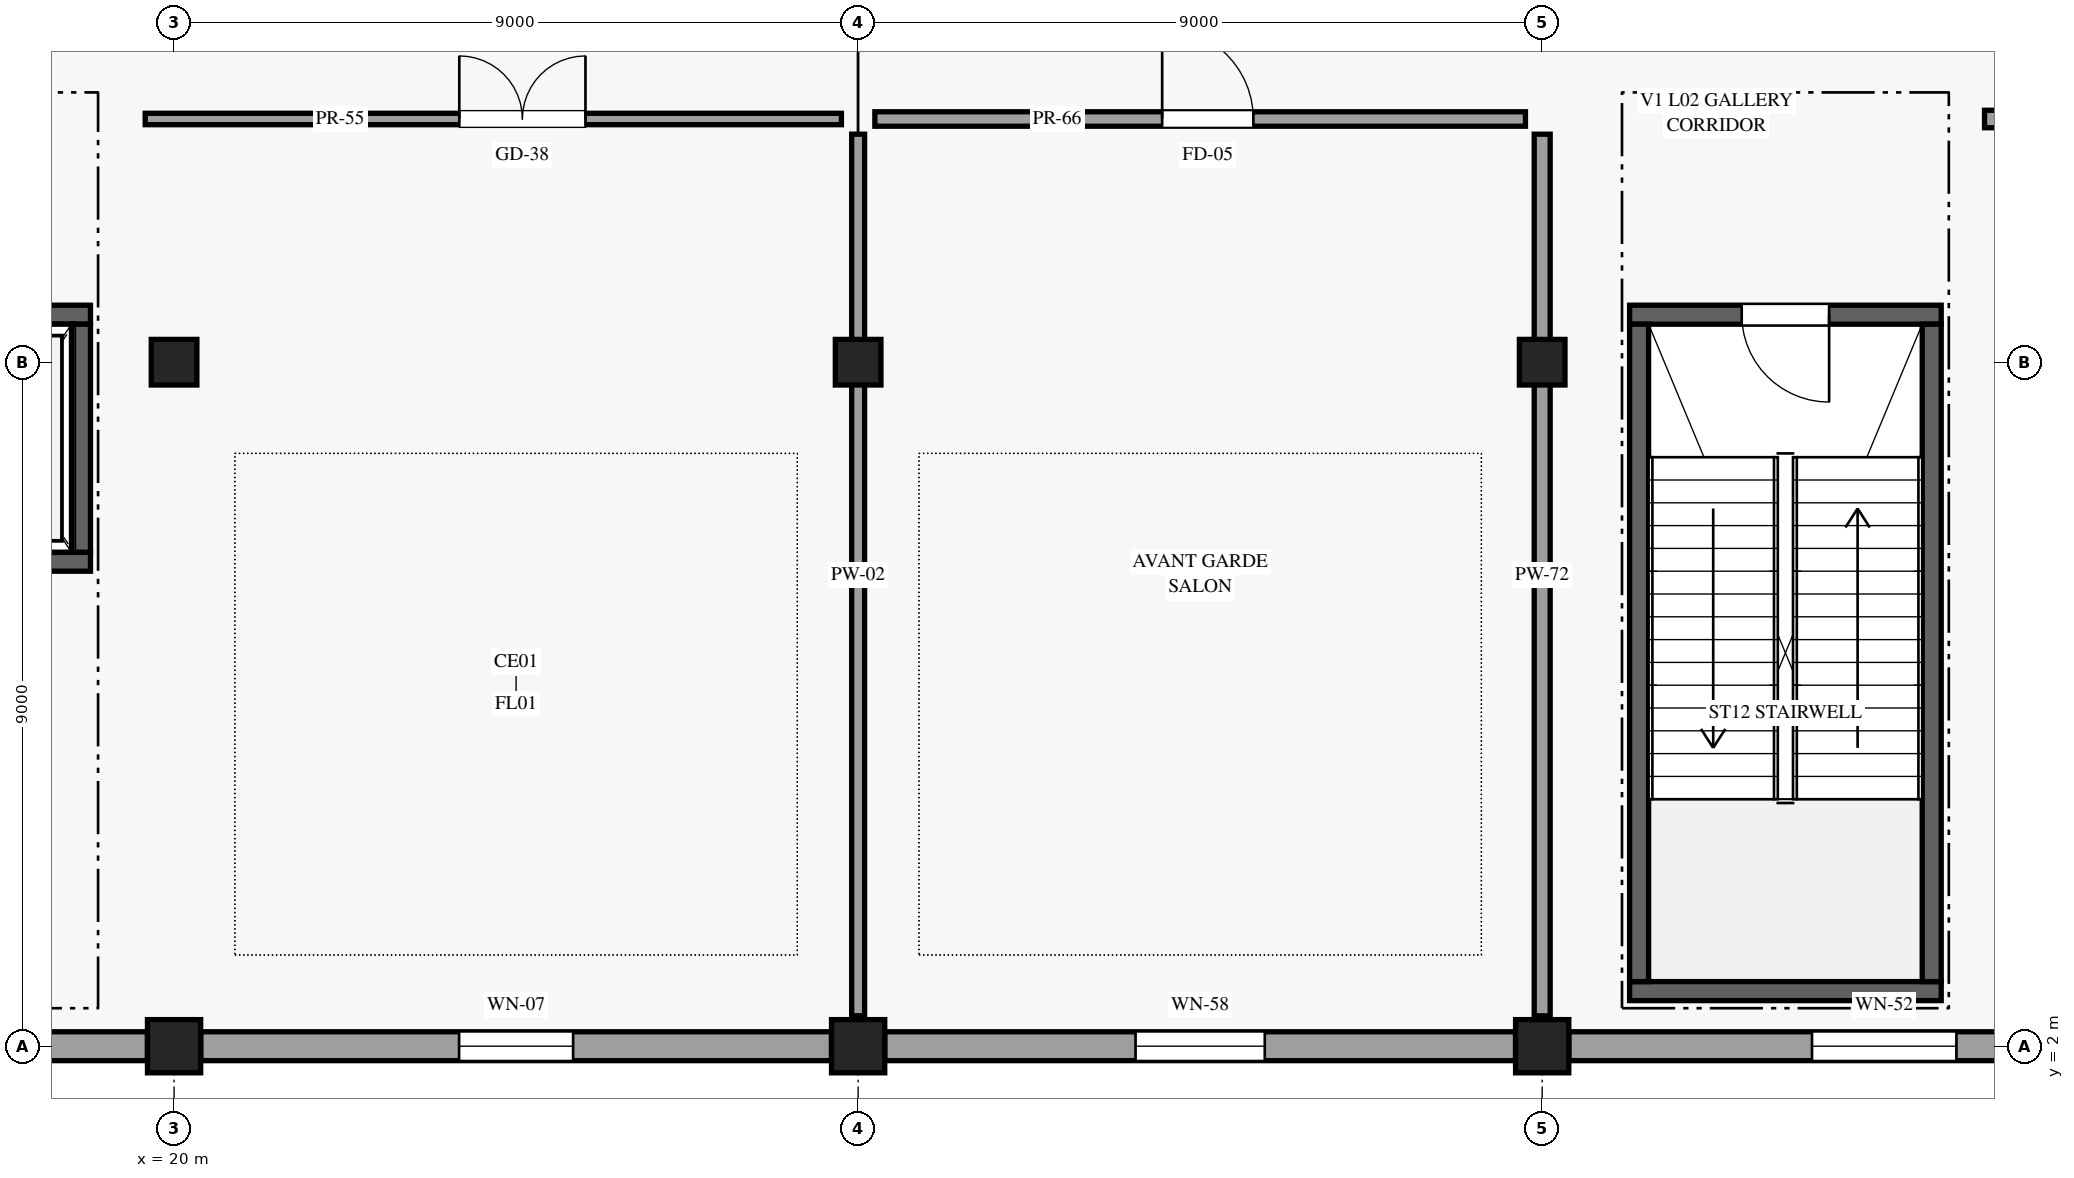
"""IFC4 building model, lengths in metres.
Left out: names, types, materials, properties, quantities, classifications, styles, units other than length and angle.
Written with IfcOpenShell. Run it as: python <this file> out.ifc"""

import sys

from ifc_helpers import new_model, si_unit, direction, frame, frame_2d, origin, origin_2d, place, context, subcontext, project, spatial, rectangle, extrude, element, fill, save


model = new_model("IFC4")
c1 = context("Model", 3, precision=1e-05, world=origin(), true_north=direction((0.0, 1.0)))
c2 = subcontext(c1, "Body", "Model", "MODEL_VIEW")
j1 = project(units=[si_unit("LENGTHUNIT", "METRE"), si_unit("PLANEANGLEUNIT", "RADIAN")], contexts=[c1])
p1 = place(None, origin())
s1 = spatial("IfcSite", under=j1, at=p1, CompositionType="ELEMENT")
p2 = place(p1, origin())
s2 = spatial("IfcBuilding", under=s1, at=p2, CompositionType="ELEMENT")
p3 = place(p2, frame((0.0, 0.0, 10.2)))
s3 = spatial("IfcBuildingStorey", under=s2, at=p3, CompositionType="ELEMENT", Elevation=10.2)
p4 = place(p3, frame((20.0, 2.0, 0.0), z_axis=(0.0, 0.0, 1.0), x_axis=(1.0, 0.0, 0.0)))
e1 = element("IfcColumn", 1, at=p4, inside=s3, PredefinedType="COLUMN", context=c2, shape_type="SweptSolid", body=[
    extrude(rectangle(XDim=0.7, YDim=0.7, at=origin_2d()), origin(), (0.0, 0.0, 1.0), 4.8),
])
p5 = place(p3, frame((20.0, 11.0, 0.0), z_axis=(0.0, 0.0, 1.0), x_axis=(1.0, 0.0, 0.0)))
e2 = element("IfcColumn", 2, at=p5, inside=s3, PredefinedType="COLUMN", context=c2, shape_type="SweptSolid", body=[
    extrude(rectangle(XDim=0.6, YDim=0.6, at=origin_2d()), origin(), (0.0, 0.0, 1.0), 4.8),
])
p6 = place(p3, frame((29.0, 2.0, 0.0), z_axis=(0.0, 0.0, 1.0), x_axis=(1.0, 0.0, 0.0)))
e3 = element("IfcColumn", 3, at=p6, inside=s3, PredefinedType="COLUMN", context=c2, shape_type="SweptSolid", body=[
    extrude(rectangle(XDim=0.7, YDim=0.7, at=origin_2d()), origin(), (0.0, 0.0, 1.0), 4.8),
])
p7 = place(p3, frame((29.0, 11.0, 0.0), z_axis=(0.0, 0.0, 1.0), x_axis=(1.0, 0.0, 0.0)))
e4 = element("IfcColumn", 4, at=p7, inside=s3, PredefinedType="COLUMN", context=c2, shape_type="SweptSolid", body=[
    extrude(rectangle(XDim=0.6, YDim=0.6, at=origin_2d()), origin(), (0.0, 0.0, 1.0), 4.8),
])
p8 = place(p3, frame((38.0, 2.0, 0.0), z_axis=(0.0, 0.0, 1.0), x_axis=(1.0, 0.0, 0.0)))
e5 = element("IfcColumn", 5, at=p8, inside=s3, PredefinedType="COLUMN", context=c2, shape_type="SweptSolid", body=[
    extrude(rectangle(XDim=0.7, YDim=0.7, at=origin_2d()), origin(), (0.0, 0.0, 1.0), 4.8),
])
p9 = place(p3, frame((38.0, 11.0, 0.0), z_axis=(0.0, 0.0, 1.0), x_axis=(1.0, 0.0, 0.0)))
e6 = element("IfcColumn", 6, at=p9, inside=s3, PredefinedType="COLUMN", context=c2, shape_type="SweptSolid", body=[
    extrude(rectangle(XDim=0.6, YDim=0.6, at=origin_2d()), origin(), (0.0, 0.0, 1.0), 4.8),
])
p10 = place(p3, frame((11.35, 2.0, 0.0), z_axis=(0.0, 0.0, 1.0), x_axis=(1.0, 0.0, 0.0)))
e7 = element("IfcWall", 7, at=p10, inside=s3, PredefinedType="STANDARD", context=c2, shape_type="SweptSolid", body=[
    extrude(rectangle(XDim=8.3, YDim=0.38, at=frame_2d((4.15, 0.0))), origin(), (0.0, 0.0, 1.0), 3.715),
])
p11 = place(p10, frame((5.775, 0.0, 0.85), z_axis=(0.0, 0.0, 1.0), x_axis=(-1.0, 0.0, 0.0)))
e8 = element("IfcOpeningElement", 8, at=p11, cuts=e7, PredefinedType="OPENING", context=c2, shape_type="SweptSolid", body=[
    extrude(rectangle(XDim=3.25, YDim=2.6, at=frame_2d((1.625, 1.3))), frame((0.0, 0.2, 0.0), z_axis=(0.0, -1.0, 0.0), x_axis=(1.0, 0.0, 0.0)), (0.0, 0.0, 1.0), 0.4),
])
p12 = place(p3, frame((20.35, 2.0, 0.0), z_axis=(0.0, 0.0, 1.0), x_axis=(1.0, 0.0, 0.0)))
e9 = element("IfcWall", 9, at=p12, inside=s3, PredefinedType="STANDARD", context=c2, shape_type="SweptSolid", body=[
    extrude(rectangle(XDim=8.3, YDim=0.38, at=frame_2d((4.15, 0.0))), origin(), (0.0, 0.0, 1.0), 3.715),
])
p13 = place(p12, frame((4.9, 0.0, 0.85), z_axis=(0.0, 0.0, 1.0), x_axis=(-1.0, 0.0, 0.0)))
e10 = element("IfcOpeningElement", 10, at=p13, cuts=e9, PredefinedType="OPENING", context=c2, shape_type="SweptSolid", body=[
    extrude(rectangle(XDim=1.5, YDim=2.2, at=frame_2d((0.75, 1.1))), frame((0.0, 0.2, 0.0), z_axis=(0.0, -1.0, 0.0), x_axis=(1.0, 0.0, 0.0)), (0.0, 0.0, 1.0), 0.4),
])
p14 = place(p3, frame((29.35, 2.0, 0.0), z_axis=(0.0, 0.0, 1.0), x_axis=(1.0, 0.0, 0.0)))
e11 = element("IfcWall", 11, at=p14, inside=s3, PredefinedType="STANDARD", context=c2, shape_type="SweptSolid", body=[
    extrude(rectangle(XDim=8.3, YDim=0.38, at=frame_2d((4.15, 0.0))), origin(), (0.0, 0.0, 1.0), 3.715),
])
p15 = place(p14, frame((5.0, 0.0, 0.85), z_axis=(0.0, 0.0, 1.0), x_axis=(-1.0, 0.0, 0.0)))
e12 = element("IfcOpeningElement", 12, at=p15, cuts=e11, PredefinedType="OPENING", context=c2, shape_type="SweptSolid", body=[
    extrude(rectangle(XDim=1.7, YDim=2.3, at=frame_2d((0.85, 1.15))), frame((0.0, 0.2, 0.0), z_axis=(0.0, -1.0, 0.0), x_axis=(1.0, 0.0, 0.0)), (0.0, 0.0, 1.0), 0.4),
])
p16 = place(p3, frame((38.35, 2.0, 0.0), z_axis=(0.0, 0.0, 1.0), x_axis=(1.0, 0.0, 0.0)))
e13 = element("IfcWall", 13, at=p16, inside=s3, PredefinedType="STANDARD", context=c2, shape_type="SweptSolid", body=[
    extrude(rectangle(XDim=8.3, YDim=0.38, at=frame_2d((4.15, 0.0))), origin(), (0.0, 0.0, 1.0), 3.715),
])
p17 = place(p16, frame((5.1, 0.0, 0.85), z_axis=(0.0, 0.0, 1.0), x_axis=(-1.0, 0.0, 0.0)))
e14 = element("IfcOpeningElement", 14, at=p17, cuts=e13, PredefinedType="OPENING", context=c2, shape_type="SweptSolid", body=[
    extrude(rectangle(XDim=1.9, YDim=2.4, at=frame_2d((0.95, 1.2))), frame((0.0, 0.2, 0.0), z_axis=(0.0, -1.0, 0.0), x_axis=(1.0, 0.0, 0.0)), (0.0, 0.0, 1.0), 0.4),
])
p18 = place(p3, frame((16.4, 11.625, 0.0), z_axis=(0.0, 0.0, 1.0), x_axis=(1.0, 0.0, 0.0)))
e15 = element("IfcWall", 15, at=p18, inside=s3, PredefinedType="SHEAR", context=c2, shape_type="SweptSolid", body=[
    extrude(rectangle(XDim=2.5, YDim=0.25, at=frame_2d((1.25, 0.0))), origin(), (0.0, 0.0, 1.0), 4.52),
])
p19 = place(p18, frame((0.7, 0.0, 0.0)))
e16 = element("IfcOpeningElement", 16, at=p19, cuts=e15, PredefinedType="OPENING", context=c2, shape_type="SweptSolid", body=[
    extrude(rectangle(XDim=1.1, YDim=2.2, at=frame_2d((0.55, 1.1))), frame((0.0, 0.135, 0.0), z_axis=(0.0, -1.0, 0.0), x_axis=(1.0, 0.0, 0.0)), (0.0, 0.0, 1.0), 0.27),
])
p20 = place(p3, frame((16.4, 8.375, 0.0), z_axis=(0.0, 0.0, 1.0), x_axis=(1.0, 0.0, 0.0)))
e17 = element("IfcWall", 17, at=p20, inside=s3, PredefinedType="SHEAR", context=c2, shape_type="SweptSolid", body=[
    extrude(rectangle(XDim=2.5, YDim=0.25, at=frame_2d((1.25, 0.0))), origin(), (0.0, 0.0, 1.0), 4.52),
])
p21 = place(p3, frame((18.775, 8.5, 0.0), z_axis=(0.0, 0.0, 1.0), x_axis=(0.0, 1.0, 0.0)))
e18 = element("IfcWall", 18, at=p21, inside=s3, PredefinedType="SHEAR", context=c2, shape_type="SweptSolid", body=[
    extrude(rectangle(XDim=3.0, YDim=0.25, at=frame_2d((1.5, 0.0))), origin(), (0.0, 0.0, 1.0), 4.52),
])
p22 = place(p3, frame((39.15, 11.625, 0.0), z_axis=(0.0, 0.0, 1.0), x_axis=(1.0, 0.0, 0.0)))
e19 = element("IfcWall", 19, at=p22, inside=s3, PredefinedType="SHEAR", context=c2, shape_type="SweptSolid", body=[
    extrude(rectangle(XDim=4.1, YDim=0.25, at=frame_2d((2.05, 0.0))), origin(), (0.0, 0.0, 1.0), 4.52),
])
p23 = place(p22, frame((2.625, 0.0, 0.0), z_axis=(0.0, 0.0, 1.0), x_axis=(-1.0, 0.0, 0.0)))
e20 = element("IfcOpeningElement", 20, at=p23, cuts=e19, PredefinedType="OPENING", context=c2, shape_type="SweptSolid", body=[
    extrude(rectangle(XDim=1.15, YDim=2.2, at=frame_2d((0.575, 1.1))), frame((0.0, 0.135, 0.0), z_axis=(0.0, -1.0, 0.0), x_axis=(1.0, 0.0, 0.0)), (0.0, 0.0, 1.0), 0.27),
])
p24 = place(p3, frame((39.15, 2.725, 0.0), z_axis=(0.0, 0.0, 1.0), x_axis=(1.0, 0.0, 0.0)))
e21 = element("IfcWall", 21, at=p24, inside=s3, PredefinedType="SHEAR", context=c2, shape_type="SweptSolid", body=[
    extrude(rectangle(XDim=4.1, YDim=0.25, at=frame_2d((2.05, 0.0))), origin(), (0.0, 0.0, 1.0), 4.52),
])
for number, where, z_axis, x_axis in (
    (22, (39.275, 2.85, 0.0), (0.0, 0.0, 1.0), (0.0, 1.0, 0.0)),
    (23, (43.125, 2.85, 0.0), (0.0, 0.0, 1.0), (0.0, 1.0, 0.0)),
):
    element("IfcWall", number, at=place(p3, frame(where, z_axis=z_axis, x_axis=x_axis)), inside=s3, PredefinedType="SHEAR", context=c2, shape_type="SweptSolid", body=[
        extrude(rectangle(XDim=8.65, YDim=0.25, at=frame_2d((4.325, 0.0))), origin(), (0.0, 0.0, 1.0), 4.52),
    ])
p25 = place(p3, frame((19.62, 14.2, 0.0), z_axis=(0.0, 0.0, 1.0), x_axis=(1.0, 0.0, 0.0)))
e24 = element("IfcWall", 24, at=p25, inside=s3, PredefinedType="PARTITIONING", context=c2, shape_type="SweptSolid", body=[
    extrude(rectangle(XDim=9.16, YDim=0.15, at=frame_2d((4.58, 0.0))), origin(), (0.0, 0.0, 1.0), 3.715),
])
p26 = place(p25, frame((4.133, 0.0, 0.0)))
e25 = element("IfcOpeningElement", 25, at=p26, cuts=e24, PredefinedType="OPENING", context=c2, shape_type="SweptSolid", body=[
    extrude(rectangle(XDim=1.66, YDim=2.42, at=frame_2d((0.83, 1.21))), frame((0.0, 0.085, 0.0), z_axis=(0.0, -1.0, 0.0), x_axis=(1.0, 0.0, 0.0)), (0.0, 0.0, 1.0), 0.17),
])
p27 = place(p3, frame((29.0, 2.4, 0.0), z_axis=(0.0, 0.0, 1.0), x_axis=(0.0, 1.0, 0.0)))
e26 = element("IfcWall", 26, at=p27, inside=s3, PredefinedType="PARTITIONING", context=c2, shape_type="SweptSolid", body=[
    extrude(rectangle(XDim=11.6, YDim=0.17, at=frame_2d((5.8, 0.0))), origin(), (0.0, 0.0, 1.0), 3.715),
])
p28 = place(p3, frame((29.22, 14.2, 0.0), z_axis=(0.0, 0.0, 1.0), x_axis=(1.0, 0.0, 0.0)))
e27 = element("IfcWall", 27, at=p28, inside=s3, PredefinedType="PARTITIONING", context=c2, shape_type="SweptSolid", body=[
    extrude(rectangle(XDim=8.56, YDim=0.19, at=frame_2d((4.28, 0.0))), origin(), (0.0, 0.0, 1.0), 3.715),
])
p29 = place(p28, frame((3.78, 0.0, 0.0)))
e28 = element("IfcOpeningElement", 28, at=p29, cuts=e27, PredefinedType="OPENING", context=c2, shape_type="SweptSolid", body=[
    extrude(rectangle(XDim=1.2, YDim=2.3, at=frame_2d((0.6, 1.15))), frame((0.0, 0.105, 0.0), z_axis=(0.0, -1.0, 0.0), x_axis=(1.0, 0.0, 0.0)), (0.0, 0.0, 1.0), 0.21),
])
p30 = place(p3, frame((38.0, 2.4, 0.0), z_axis=(0.0, 0.0, 1.0), x_axis=(0.0, 1.0, 0.0)))
e29 = element("IfcWall", 29, at=p30, inside=s3, PredefinedType="PARTITIONING", context=c2, shape_type="SweptSolid", body=[
    extrude(rectangle(XDim=11.6, YDim=0.21, at=frame_2d((5.8, 0.0))), origin(), (0.0, 0.0, 1.0), 3.715),
])
p31 = place(p3, frame((43.82, 14.2, 0.0), z_axis=(0.0, 0.0, 1.0), x_axis=(1.0, 0.0, 0.0)))
e30 = element("IfcWall", 30, at=p31, inside=s3, PredefinedType="PARTITIONING", context=c2, shape_type="SweptSolid", body=[
    extrude(rectangle(XDim=11.96, YDim=0.23, at=frame_2d((5.98, 0.0))), origin(), (0.0, 0.0, 1.0), 3.715),
])
p32 = place(p31, frame((6.94, 0.0, 0.0)))
e31 = element("IfcOpeningElement", 31, at=p32, cuts=e30, PredefinedType="OPENING", context=c2, shape_type="SweptSolid", body=[
    extrude(rectangle(XDim=1.42, YDim=2.3, at=frame_2d((0.71, 1.15))), frame((0.0, 0.125, 0.0), z_axis=(0.0, -1.0, 0.0), x_axis=(1.0, 0.0, 0.0)), (0.0, 0.0, 1.0), 0.25),
])
p33 = place(p13, origin())
e32 = element("IfcWindow", 32, at=p33, inside=s3, PartitioningType="SINGLE_PANEL", PredefinedType="WINDOW", context=c2, shape_type="SweptSolid", body=[
    extrude(rectangle(XDim=1.5, YDim=2.2, at=frame_2d((0.75, 1.1))), frame((0.0, 0.03, 0.0), z_axis=(0.0, -1.0, 0.0), x_axis=(1.0, 0.0, 0.0)), (0.0, 0.0, 1.0), 0.06),
])
fill(e10, e32)
p34 = place(p15, origin())
e33 = element("IfcWindow", 33, at=p34, inside=s3, PartitioningType="SINGLE_PANEL", PredefinedType="WINDOW", context=c2, shape_type="SweptSolid", body=[
    extrude(rectangle(XDim=1.7, YDim=2.3, at=frame_2d((0.85, 1.15))), frame((0.0, 0.03, 0.0), z_axis=(0.0, -1.0, 0.0), x_axis=(1.0, 0.0, 0.0)), (0.0, 0.0, 1.0), 0.06),
])
fill(e12, e33)
p35 = place(p17, origin())
e34 = element("IfcWindow", 34, at=p35, inside=s3, PartitioningType="SINGLE_PANEL", PredefinedType="WINDOW", context=c2, shape_type="SweptSolid", body=[
    extrude(rectangle(XDim=1.9, YDim=2.4, at=frame_2d((0.95, 1.2))), frame((0.0, 0.03, 0.0), z_axis=(0.0, -1.0, 0.0), x_axis=(1.0, 0.0, 0.0)), (0.0, 0.0, 1.0), 0.06),
])
fill(e14, e34)
p36 = place(p23, origin())
e35 = element("IfcDoor", 35, at=p36, inside=s3, OperationType="SINGLE_SWING_LEFT", PredefinedType="DOOR", context=c2, shape_type="SweptSolid", body=[
    extrude(rectangle(XDim=1.15, YDim=2.2, at=frame_2d((0.575, 1.1))), frame((0.0, 0.025, 0.0), z_axis=(0.0, -1.0, 0.0), x_axis=(1.0, 0.0, 0.0)), (0.0, 0.0, 1.0), 0.05),
])
fill(e20, e35)
p37 = place(p26, origin())
e36 = element("IfcDoor", 36, at=p37, inside=s3, OperationType="DOUBLE_DOOR_SINGLE_SWING", PredefinedType="DOOR", context=c2, shape_type="SweptSolid", body=[
    extrude(rectangle(XDim=1.66, YDim=2.42, at=frame_2d((0.83, 1.21))), frame((0.0, 0.025, 0.0), z_axis=(0.0, -1.0, 0.0), x_axis=(1.0, 0.0, 0.0)), (0.0, 0.0, 1.0), 0.05),
])
fill(e25, e36)
p38 = place(p29, origin())
e37 = element("IfcDoor", 37, at=p38, inside=s3, OperationType="SINGLE_SWING_LEFT", PredefinedType="DOOR", context=c2, shape_type="SweptSolid", body=[
    extrude(rectangle(XDim=1.2, YDim=2.3, at=frame_2d((0.6, 1.15))), frame((0.0, 0.025, 0.0), z_axis=(0.0, -1.0, 0.0), x_axis=(1.0, 0.0, 0.0)), (0.0, 0.0, 1.0), 0.05),
])
fill(e28, e37)
save(model, sys.argv[1])
